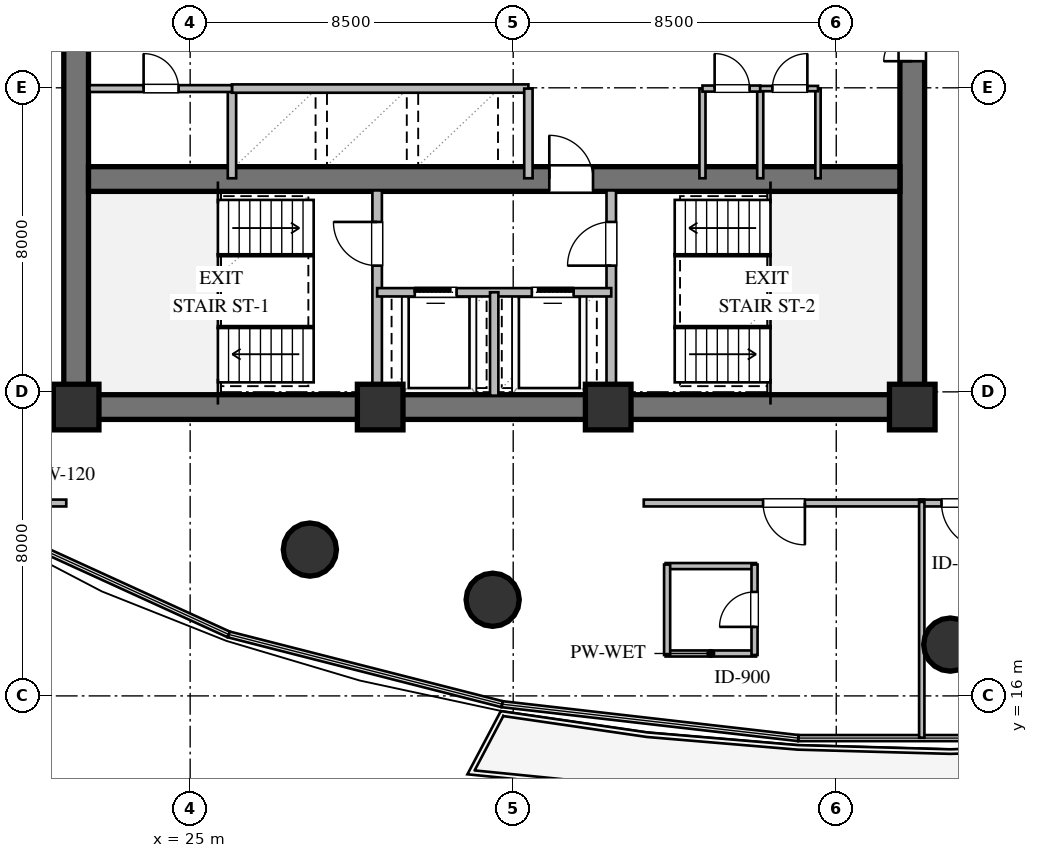
"""IFC4 building model, lengths in metres.
Left out: names, types, materials, properties, quantities, classifications, styles, units other than length and angle.
Written with IfcOpenShell. Run it as: python <this file> out.ifc"""

import sys

from ifc_helpers import new_model, si_unit, direction, frame, frame_2d, origin, origin_2d, place, context, subcontext, project, spatial, rectangle, circle, extrude, element, fill, save


model = new_model("IFC4")
c1 = context("Model", 3, precision=1e-05, world=origin(), true_north=direction((0.0, 1.0)))
c2 = subcontext(c1, "Body", "Model", "MODEL_VIEW")
j1 = project(units=[si_unit("LENGTHUNIT", "METRE"), si_unit("PLANEANGLEUNIT", "RADIAN")], contexts=[c1])
p1 = place(None, origin())
s1 = spatial("IfcSite", under=j1, at=p1, CompositionType="ELEMENT")
p2 = place(p1, origin())
s2 = spatial("IfcBuilding", under=s1, at=p2, CompositionType="ELEMENT")
p3 = place(p2, frame((0.0, 0.0, 49.2)))
s3 = spatial("IfcBuildingStorey", under=s2, at=p3, CompositionType="ELEMENT", Elevation=49.2)
p4 = place(p3, frame((21.675, 23.6, 0.0), z_axis=(0.0, 0.0, 1.0), x_axis=(1.0, 0.0, 0.0)))
e1 = element("IfcWall", 1, at=p4, inside=s3, PredefinedType="SHEAR", context=c2, shape_type="SweptSolid", body=[
    extrude(rectangle(XDim=22.65, YDim=0.65, at=frame_2d((11.325, 0.0))), origin(), (0.0, 0.0, 1.0), 3.36),
])
p5 = place(p3, frame((22.0, 23.925, 0.0), z_axis=(0.0, 0.0, 1.0), x_axis=(0.0, 1.0, 0.0)))
e2 = element("IfcWall", 2, at=p5, inside=s3, PredefinedType="SHEAR", context=c2, shape_type="SweptSolid", body=[
    extrude(rectangle(XDim=12.15, YDim=0.65, at=frame_2d((6.075, 0.0))), origin(), (0.0, 0.0, 1.0), 3.36),
])
p6 = place(p3, frame((44.0, 23.925, 0.0), z_axis=(0.0, 0.0, 1.0), x_axis=(0.0, 1.0, 0.0)))
e3 = element("IfcWall", 3, at=p6, inside=s3, PredefinedType="SHEAR", context=c2, shape_type="SweptSolid", body=[
    extrude(rectangle(XDim=12.15, YDim=0.65, at=frame_2d((6.075, 0.0))), origin(), (0.0, 0.0, 1.0), 3.36),
])
p7 = place(p6, frame((8.775, 0.0, 0.0)))
e4 = element("IfcOpeningElement", 4, at=p7, cuts=e3, PredefinedType="OPENING", context=c2, shape_type="SweptSolid", body=[
    extrude(rectangle(XDim=1.5, YDim=2.15, at=frame_2d((0.75, 1.075))), frame((0.0, 0.335, 0.0), z_axis=(0.0, -1.0, 0.0), x_axis=(1.0, 0.0, 0.0)), (0.0, 0.0, 1.0), 0.67),
])
p8 = place(p3, frame((22.325, 29.6, 0.0), z_axis=(0.0, 0.0, 1.0), x_axis=(1.0, 0.0, 0.0)))
e5 = element("IfcWall", 5, at=p8, inside=s3, PredefinedType="SHEAR", context=c2, shape_type="SweptSolid", body=[
    extrude(rectangle(XDim=21.35, YDim=0.65, at=frame_2d((10.675, 0.0))), origin(), (0.0, 0.0, 1.0), 3.36),
])
p9 = place(p8, frame((12.125, 0.0, 0.0)))
e6 = element("IfcOpeningElement", 6, at=p9, cuts=e5, PredefinedType="OPENING", context=c2, shape_type="SweptSolid", body=[
    extrude(rectangle(XDim=1.15, YDim=2.1, at=frame_2d((0.575, 1.05))), frame((0.0, 0.335, 0.0), z_axis=(0.0, -1.0, 0.0), x_axis=(1.0, 0.0, 0.0)), (0.0, 0.0, 1.0), 0.67),
])
for number, where, z_axis, x_axis in (
    (7, (22.0, 23.6, 0.0), (0.0, 0.0, 1.0), (1.0, 0.0, 0.0)),
    (8, (30.0, 23.6, 0.0), (0.0, 0.0, 1.0), (1.0, 0.0, 0.0)),
    (9, (36.0, 23.6, 0.0), (0.0, 0.0, 1.0), (1.0, 0.0, 0.0)),
    (10, (44.0, 23.6, 0.0), (0.0, 0.0, 1.0), (1.0, 0.0, 0.0)),
):
    element("IfcColumn", number, at=place(p3, frame(where, z_axis=z_axis, x_axis=x_axis)), inside=s3, PredefinedType="COLUMN", context=c2, shape_type="SweptSolid", body=[
        extrude(rectangle(XDim=1.2, YDim=1.2, at=origin_2d()), origin(), (0.0, 0.0, 1.0), 3.6),
    ])
for number, where, z_axis, x_axis in (
    (11, (28.15, 19.85, 0.0), (0.0, 0.0, 1.0), (1.0, 0.0, 0.0)),
    (12, (32.96, 18.53, 0.0), (0.0, 0.0, 1.0), (1.0, 0.0, 0.0)),
    (13, (45.0, 17.35, 0.0), (0.0, 0.0, 1.0), (1.0, 0.0, 0.0)),
):
    element("IfcColumn", number, at=place(p3, frame(where, z_axis=z_axis, x_axis=x_axis)), inside=s3, PredefinedType="COLUMN", context=c2, shape_type="SweptSolid", body=[
        extrude(circle(Radius=0.7, at=origin_2d()), origin(), (0.0, 0.0, 1.0), 3.6),
    ])
p10 = place(p3, frame((29.92, 23.9, 0.0), z_axis=(0.0, 0.0, 1.0), x_axis=(0.0, 1.0, 0.0)))
e14 = element("IfcWall", 14, at=p10, inside=s3, PredefinedType="SOLIDWALL", context=c2, shape_type="SweptSolid", body=[
    extrude(rectangle(XDim=5.4, YDim=0.25, at=frame_2d((2.7, 0.0))), origin(), (0.0, 0.0, 1.0), 3.36),
])
p11 = place(p10, frame((3.421, 0.0, 0.0)))
e15 = element("IfcOpeningElement", 15, at=p11, cuts=e14, PredefinedType="OPENING", context=c2, shape_type="SweptSolid", body=[
    extrude(rectangle(XDim=1.15, YDim=2.1, at=frame_2d((0.575, 1.05))), frame((0.0, 0.135, 0.0), z_axis=(0.0, -1.0, 0.0), x_axis=(1.0, 0.0, 0.0)), (0.0, 0.0, 1.0), 0.27),
])
p12 = place(p3, frame((36.08, 23.9, 0.0), z_axis=(0.0, 0.0, 1.0), x_axis=(0.0, 1.0, 0.0)))
e16 = element("IfcWall", 16, at=p12, inside=s3, PredefinedType="SOLIDWALL", context=c2, shape_type="SweptSolid", body=[
    extrude(rectangle(XDim=5.4, YDim=0.25, at=frame_2d((2.7, 0.0))), origin(), (0.0, 0.0, 1.0), 3.36),
])
p13 = place(p12, frame((3.421, 0.0, 0.0)))
e17 = element("IfcOpeningElement", 17, at=p13, cuts=e16, PredefinedType="OPENING", context=c2, shape_type="SweptSolid", body=[
    extrude(rectangle(XDim=1.15, YDim=2.1, at=frame_2d((0.575, 1.05))), frame((0.0, 0.135, 0.0), z_axis=(0.0, -1.0, 0.0), x_axis=(1.0, 0.0, 0.0)), (0.0, 0.0, 1.0), 0.27),
])
p14 = place(p3, frame((29.92, 26.62, 0.0), z_axis=(0.0, 0.0, 1.0), x_axis=(1.0, 0.0, 0.0)))
e18 = element("IfcWall", 18, at=p14, inside=s3, PredefinedType="SOLIDWALL", context=c2, shape_type="SweptSolid", body=[
    extrude(rectangle(XDim=6.16, YDim=0.22, at=frame_2d((3.08, 0.0))), origin(), (0.0, 0.0, 1.0), 3.36),
])
p15 = place(p14, frame((0.99, 0.0, 0.0)))
e19 = element("IfcOpeningElement", 19, at=p15, cuts=e18, PredefinedType="OPENING", context=c2, shape_type="SweptSolid", body=[
    extrude(rectangle(XDim=1.1, YDim=2.1, at=frame_2d((0.55, 1.05))), frame((0.0, 0.12, 0.0), z_axis=(0.0, -1.0, 0.0), x_axis=(1.0, 0.0, 0.0)), (0.0, 0.0, 1.0), 0.24),
])
p16 = place(p14, frame((4.07, 0.0, 0.0)))
e20 = element("IfcOpeningElement", 20, at=p16, cuts=e18, PredefinedType="OPENING", context=c2, shape_type="SweptSolid", body=[
    extrude(rectangle(XDim=1.1, YDim=2.1, at=frame_2d((0.55, 1.05))), frame((0.0, 0.12, 0.0), z_axis=(0.0, -1.0, 0.0), x_axis=(1.0, 0.0, 0.0)), (0.0, 0.0, 1.0), 0.24),
])
p17 = place(p3, frame((33.0, 23.9, 0.0), z_axis=(0.0, 0.0, 1.0), x_axis=(0.0, 1.0, 0.0)))
e21 = element("IfcWall", 21, at=p17, inside=s3, PredefinedType="SOLIDWALL", context=c2, shape_type="SweptSolid", body=[
    extrude(rectangle(XDim=2.72, YDim=0.22, at=frame_2d((1.36, 0.0))), origin(), (0.0, 0.0, 1.0), 3.36),
])
p18 = place(p3, frame((26.1, 29.62, 0.0), z_axis=(0.0, 0.0, 1.0), x_axis=(0.0, 1.0, 0.0)))
e22 = element("IfcWall", 22, at=p18, inside=s3, PredefinedType="SOLIDWALL", context=c2, shape_type="SweptSolid", body=[
    extrude(rectangle(XDim=2.36, YDim=0.22, at=frame_2d((1.18, 0.0))), origin(), (0.0, 0.0, 1.0), 3.36),
])
p19 = place(p3, frame((26.1, 31.98, 0.0), z_axis=(0.0, 0.0, 1.0), x_axis=(1.0, 0.0, 0.0)))
e23 = element("IfcWall", 23, at=p19, inside=s3, PredefinedType="SOLIDWALL", context=c2, shape_type="SweptSolid", body=[
    extrude(rectangle(XDim=7.8, YDim=0.22, at=frame_2d((3.9, 0.0))), origin(), (0.0, 0.0, 1.0), 3.36),
])
p20 = place(p3, frame((33.9, 29.62, 0.0), z_axis=(0.0, 0.0, 1.0), x_axis=(0.0, 1.0, 0.0)))
e24 = element("IfcWall", 24, at=p20, inside=s3, PredefinedType="SOLIDWALL", context=c2, shape_type="SweptSolid", body=[
    extrude(rectangle(XDim=2.36, YDim=0.22, at=frame_2d((1.18, 0.0))), origin(), (0.0, 0.0, 1.0), 3.36),
])
p21 = place(p3, frame((22.35, 31.98, 0.0), z_axis=(0.0, 0.0, 1.0), x_axis=(1.0, 0.0, 0.0)))
e25 = element("IfcWall", 25, at=p21, inside=s3, PredefinedType="PARTITIONING", context=c2, shape_type="SweptSolid", body=[
    extrude(rectangle(XDim=3.75, YDim=0.18, at=frame_2d((1.875, 0.0))), origin(), (0.0, 0.0, 1.0), 3.36),
])
p22 = place(p21, frame((1.425, 0.0, 0.0)))
e26 = element("IfcOpeningElement", 26, at=p22, cuts=e25, PredefinedType="OPENING", context=c2, shape_type="SweptSolid", body=[
    extrude(rectangle(XDim=0.92, YDim=2.1, at=frame_2d((0.46, 1.05))), frame((0.0, 0.1, 0.0), z_axis=(0.0, -1.0, 0.0), x_axis=(1.0, 0.0, 0.0)), (0.0, 0.0, 1.0), 0.2),
])
for number, where, z_axis, x_axis in (
    (27, (38.48, 29.62, 0.0), (0.0, 0.0, 1.0), (0.0, 1.0, 0.0)),
    (28, (40.0, 29.62, 0.0), (0.0, 0.0, 1.0), (0.0, 1.0, 0.0)),
):
    element("IfcWall", number, at=place(p3, frame(where, z_axis=z_axis, x_axis=x_axis)), inside=s3, PredefinedType="PLUMBINGWALL", context=c2, shape_type="SweptSolid", body=[
        extrude(rectangle(XDim=2.36, YDim=0.16, at=frame_2d((1.18, 0.0))), origin(), (0.0, 0.0, 1.0), 3.36),
    ])
p23 = place(p3, frame((41.52, 29.62, 0.0), z_axis=(0.0, 0.0, 1.0), x_axis=(0.0, 1.0, 0.0)))
e29 = element("IfcWall", 29, at=p23, inside=s3, PredefinedType="PARTITIONING", context=c2, shape_type="SweptSolid", body=[
    extrude(rectangle(XDim=2.36, YDim=0.14, at=frame_2d((1.18, 0.0))), origin(), (0.0, 0.0, 1.0), 3.36),
])
p24 = place(p3, frame((38.48, 31.98, 0.0), z_axis=(0.0, 0.0, 1.0), x_axis=(1.0, 0.0, 0.0)))
e30 = element("IfcWall", 30, at=p24, inside=s3, PredefinedType="PLUMBINGWALL", context=c2, shape_type="SweptSolid", body=[
    extrude(rectangle(XDim=1.52, YDim=0.16, at=frame_2d((0.76, 0.0))), origin(), (0.0, 0.0, 1.0), 3.36),
])
p25 = place(p24, frame((0.32, 0.0, 0.0)))
e31 = element("IfcOpeningElement", 31, at=p25, cuts=e30, PredefinedType="OPENING", context=c2, shape_type="SweptSolid", body=[
    extrude(rectangle(XDim=0.92, YDim=2.1, at=frame_2d((0.46, 1.05))), frame((0.0, 0.09, 0.0), z_axis=(0.0, -1.0, 0.0), x_axis=(1.0, 0.0, 0.0)), (0.0, 0.0, 1.0), 0.18),
])
p26 = place(p3, frame((40.0, 31.98, 0.0), z_axis=(0.0, 0.0, 1.0), x_axis=(1.0, 0.0, 0.0)))
e32 = element("IfcWall", 32, at=p26, inside=s3, PredefinedType="PARTITIONING", context=c2, shape_type="SweptSolid", body=[
    extrude(rectangle(XDim=1.52, YDim=0.14, at=frame_2d((0.76, 0.0))), origin(), (0.0, 0.0, 1.0), 3.36),
])
p27 = place(p26, frame((0.32, 0.0, 0.0)))
e33 = element("IfcOpeningElement", 33, at=p27, cuts=e32, PredefinedType="OPENING", context=c2, shape_type="SweptSolid", body=[
    extrude(rectangle(XDim=0.92, YDim=2.1, at=frame_2d((0.46, 1.05))), frame((0.0, 0.08, 0.0), z_axis=(0.0, -1.0, 0.0), x_axis=(1.0, 0.0, 0.0)), (0.0, 0.0, 1.0), 0.16),
])
for number, where, z_axis, x_axis in (
    (34, (37.51, 17.116, 0.0), (0.0, 0.0, 1.0), (1.0, 0.0, 0.0)),
    (35, (37.51, 19.416, 0.0), (0.0, 0.0, 1.0), (1.0, 0.0, 0.0)),
):
    element("IfcWall", number, at=place(p3, frame(where, z_axis=z_axis, x_axis=x_axis)), inside=s3, PredefinedType="PLUMBINGWALL", context=c2, shape_type="SweptSolid", body=[
        extrude(rectangle(XDim=2.38, YDim=0.16, at=frame_2d((1.19, 0.0))), origin(), (0.0, 0.0, 1.0), 3.36),
    ])
p28 = place(p3, frame((37.55, 17.076, 0.0), z_axis=(0.0, 0.0, 1.0), x_axis=(0.0, 1.0, 0.0)))
e36 = element("IfcWall", 36, at=p28, inside=s3, PredefinedType="PLUMBINGWALL", context=c2, shape_type="SweptSolid", body=[
    extrude(rectangle(XDim=2.38, YDim=0.16, at=frame_2d((1.19, 0.0))), origin(), (0.0, 0.0, 1.0), 3.36),
])
p29 = place(p3, frame((39.85, 17.076, 0.0), z_axis=(0.0, 0.0, 1.0), x_axis=(0.0, 1.0, 0.0)))
e37 = element("IfcWall", 37, at=p29, inside=s3, PredefinedType="PLUMBINGWALL", context=c2, shape_type="SweptSolid", body=[
    extrude(rectangle(XDim=2.38, YDim=0.16, at=frame_2d((1.19, 0.0))), origin(), (0.0, 0.0, 1.0), 3.36),
])
p30 = place(p29, frame((0.74, 0.0, 0.0)))
e38 = element("IfcOpeningElement", 38, at=p30, cuts=e37, PredefinedType="OPENING", context=c2, shape_type="SweptSolid", body=[
    extrude(rectangle(XDim=0.92, YDim=2.1, at=frame_2d((0.46, 1.05))), frame((0.0, 0.09, 0.0), z_axis=(0.0, -1.0, 0.0), x_axis=(1.0, 0.0, 0.0)), (0.0, 0.0, 1.0), 0.18),
])
p31 = place(p3, frame((44.315, 21.075, 0.0), z_axis=(0.0, 0.0, 1.0), x_axis=(-1.0, 0.0, 0.0)))
e39 = element("IfcWall", 39, at=p31, inside=s3, PredefinedType="PARTITIONING", context=c2, shape_type="SweptSolid", body=[
    extrude(rectangle(XDim=7.38, YDim=0.18, at=frame_2d((3.69, 0.0))), origin(), (0.0, 0.0, 1.0), 2.996),
])
p32 = place(p31, frame((3.14, 0.0, 0.0)))
e40 = element("IfcOpeningElement", 40, at=p32, cuts=e39, PredefinedType="OPENING", context=c2, shape_type="SweptSolid", body=[
    extrude(rectangle(XDim=1.1, YDim=2.1, at=frame_2d((0.55, 1.05))), frame((0.0, 0.1, 0.0), z_axis=(0.0, -1.0, 0.0), x_axis=(1.0, 0.0, 0.0)), (0.0, 0.0, 1.0), 0.2),
])
p33 = place(p3, frame((46.555, 21.075, 0.0), z_axis=(0.0, 0.0, 1.0), x_axis=(-1.0, 0.0, 0.0)))
e41 = element("IfcWall", 41, at=p33, inside=s3, PredefinedType="PARTITIONING", context=c2, shape_type="SweptSolid", body=[
    extrude(rectangle(XDim=2.37, YDim=0.18, at=frame_2d((1.185, 0.0))), origin(), (0.0, 0.0, 1.0), 3.36),
])
p34 = place(p33, frame((0.585, 0.0, 0.0)))
e42 = element("IfcOpeningElement", 42, at=p34, cuts=e41, PredefinedType="OPENING", context=c2, shape_type="SweptSolid", body=[
    extrude(rectangle(XDim=1.2, YDim=2.15, at=frame_2d((0.6, 1.075))), frame((0.0, 0.1, 0.0), z_axis=(0.0, -1.0, 0.0), x_axis=(1.0, 0.0, 0.0)), (0.0, 0.0, 1.0), 0.2),
])
p35 = place(p3, frame((21.74, 21.075, 0.0), z_axis=(0.0, 0.0, 1.0), x_axis=(-1.0, 0.0, 0.0)))
e43 = element("IfcWall", 43, at=p35, inside=s3, PredefinedType="PARTITIONING", context=c2, shape_type="SweptSolid", body=[
    extrude(rectangle(XDim=2.645, YDim=0.18, at=frame_2d((1.323, 0.0))), origin(), (0.0, 0.0, 1.0), 3.36),
])
p36 = place(p3, frame((44.25, 21.105, 0.0), z_axis=(0.0, 0.0, 1.0), x_axis=(0.0, -1.0, 0.0)))
e44 = element("IfcWall", 44, at=p36, inside=s3, PredefinedType="PARTITIONING", context=c2, shape_type="SweptSolid", body=[
    extrude(rectangle(XDim=6.205, YDim=0.14, at=frame_2d((3.103, 0.0))), origin(), (0.0, 0.0, 1.0), 2.806),
])
p37 = place(p11, origin())
e45 = element("IfcDoor", 45, at=p37, inside=s3, OperationType="SINGLE_SWING_RIGHT", PredefinedType="DOOR", context=c2, shape_type="SweptSolid", body=[
    extrude(rectangle(XDim=1.15, YDim=2.1, at=frame_2d((0.575, 1.05))), frame((0.0, 0.025, 0.0), z_axis=(0.0, -1.0, 0.0), x_axis=(1.0, 0.0, 0.0)), (0.0, 0.0, 1.0), 0.05),
])
fill(e15, e45)
p38 = place(p13, origin())
e46 = element("IfcDoor", 46, at=p38, inside=s3, OperationType="SINGLE_SWING_LEFT", PredefinedType="DOOR", context=c2, shape_type="SweptSolid", body=[
    extrude(rectangle(XDim=1.15, YDim=2.1, at=frame_2d((0.575, 1.05))), frame((0.0, 0.025, 0.0), z_axis=(0.0, -1.0, 0.0), x_axis=(1.0, 0.0, 0.0)), (0.0, 0.0, 1.0), 0.05),
])
fill(e17, e46)
p39 = place(p15, origin())
e47 = element("IfcDoor", 47, at=p39, inside=s3, OperationType="SLIDING_TO_LEFT", PredefinedType="DOOR", context=c2, shape_type="SweptSolid", body=[
    extrude(rectangle(XDim=1.1, YDim=2.1, at=frame_2d((0.55, 1.05))), frame((0.0, 0.025, 0.0), z_axis=(0.0, -1.0, 0.0), x_axis=(1.0, 0.0, 0.0)), (0.0, 0.0, 1.0), 0.05),
])
fill(e19, e47)
p40 = place(p16, origin())
e48 = element("IfcDoor", 48, at=p40, inside=s3, OperationType="SLIDING_TO_RIGHT", PredefinedType="DOOR", context=c2, shape_type="SweptSolid", body=[
    extrude(rectangle(XDim=1.1, YDim=2.1, at=frame_2d((0.55, 1.05))), frame((0.0, 0.025, 0.0), z_axis=(0.0, -1.0, 0.0), x_axis=(1.0, 0.0, 0.0)), (0.0, 0.0, 1.0), 0.05),
])
fill(e20, e48)
p41 = place(p9, origin())
e49 = element("IfcDoor", 49, at=p41, inside=s3, OperationType="SINGLE_SWING_LEFT", PredefinedType="DOOR", context=c2, shape_type="SweptSolid", body=[
    extrude(rectangle(XDim=1.15, YDim=2.1, at=frame_2d((0.575, 1.05))), frame((0.0, 0.025, 0.0), z_axis=(0.0, -1.0, 0.0), x_axis=(1.0, 0.0, 0.0)), (0.0, 0.0, 1.0), 0.05),
])
fill(e6, e49)
p42 = place(p7, origin())
e50 = element("IfcDoor", 50, at=p42, inside=s3, OperationType="DOUBLE_DOOR_SINGLE_SWING", PredefinedType="DOOR", context=c2, shape_type="SweptSolid", body=[
    extrude(rectangle(XDim=1.5, YDim=2.15, at=frame_2d((0.75, 1.075))), frame((0.0, 0.025, 0.0), z_axis=(0.0, -1.0, 0.0), x_axis=(1.0, 0.0, 0.0)), (0.0, 0.0, 1.0), 0.05),
])
fill(e4, e50)
p43 = place(p22, origin())
e51 = element("IfcDoor", 51, at=p43, inside=s3, OperationType="SINGLE_SWING_LEFT", PredefinedType="DOOR", context=c2, shape_type="SweptSolid", body=[
    extrude(rectangle(XDim=0.92, YDim=2.1, at=frame_2d((0.46, 1.05))), frame((0.0, 0.025, 0.0), z_axis=(0.0, -1.0, 0.0), x_axis=(1.0, 0.0, 0.0)), (0.0, 0.0, 1.0), 0.05),
])
fill(e26, e51)
p44 = place(p25, origin())
e52 = element("IfcDoor", 52, at=p44, inside=s3, OperationType="SINGLE_SWING_LEFT", PredefinedType="DOOR", context=c2, shape_type="SweptSolid", body=[
    extrude(rectangle(XDim=0.92, YDim=2.1, at=frame_2d((0.46, 1.05))), frame((0.0, 0.025, 0.0), z_axis=(0.0, -1.0, 0.0), x_axis=(1.0, 0.0, 0.0)), (0.0, 0.0, 1.0), 0.05),
])
fill(e31, e52)
p45 = place(p27, origin())
e53 = element("IfcDoor", 53, at=p45, inside=s3, OperationType="SINGLE_SWING_RIGHT", PredefinedType="DOOR", context=c2, shape_type="SweptSolid", body=[
    extrude(rectangle(XDim=0.92, YDim=2.1, at=frame_2d((0.46, 1.05))), frame((0.0, 0.025, 0.0), z_axis=(0.0, -1.0, 0.0), x_axis=(1.0, 0.0, 0.0)), (0.0, 0.0, 1.0), 0.05),
])
fill(e33, e53)
p46 = place(p30, origin())
e54 = element("IfcDoor", 54, at=p46, inside=s3, OperationType="SINGLE_SWING_LEFT", PredefinedType="DOOR", context=c2, shape_type="SweptSolid", body=[
    extrude(rectangle(XDim=0.92, YDim=2.1, at=frame_2d((0.46, 1.05))), frame((0.0, 0.025, 0.0), z_axis=(0.0, -1.0, 0.0), x_axis=(1.0, 0.0, 0.0)), (0.0, 0.0, 1.0), 0.05),
])
fill(e38, e54)
p47 = place(p32, origin())
e55 = element("IfcDoor", 55, at=p47, inside=s3, OperationType="SINGLE_SWING_LEFT", PredefinedType="DOOR", context=c2, shape_type="SweptSolid", body=[
    extrude(rectangle(XDim=1.1, YDim=2.1, at=frame_2d((0.55, 1.05))), frame((0.0, 0.025, 0.0), z_axis=(0.0, -1.0, 0.0), x_axis=(1.0, 0.0, 0.0)), (0.0, 0.0, 1.0), 0.05),
])
fill(e40, e55)
p48 = place(p34, origin())
e56 = element("IfcDoor", 56, at=p48, inside=s3, OperationType="SINGLE_SWING_LEFT", PredefinedType="DOOR", context=c2, shape_type="SweptSolid", body=[
    extrude(rectangle(XDim=1.2, YDim=2.15, at=frame_2d((0.6, 1.075))), frame((0.0, 0.025, 0.0), z_axis=(0.0, -1.0, 0.0), x_axis=(1.0, 0.0, 0.0)), (0.0, 0.0, 1.0), 0.05),
])
fill(e42, e56)
save(model, sys.argv[1])
